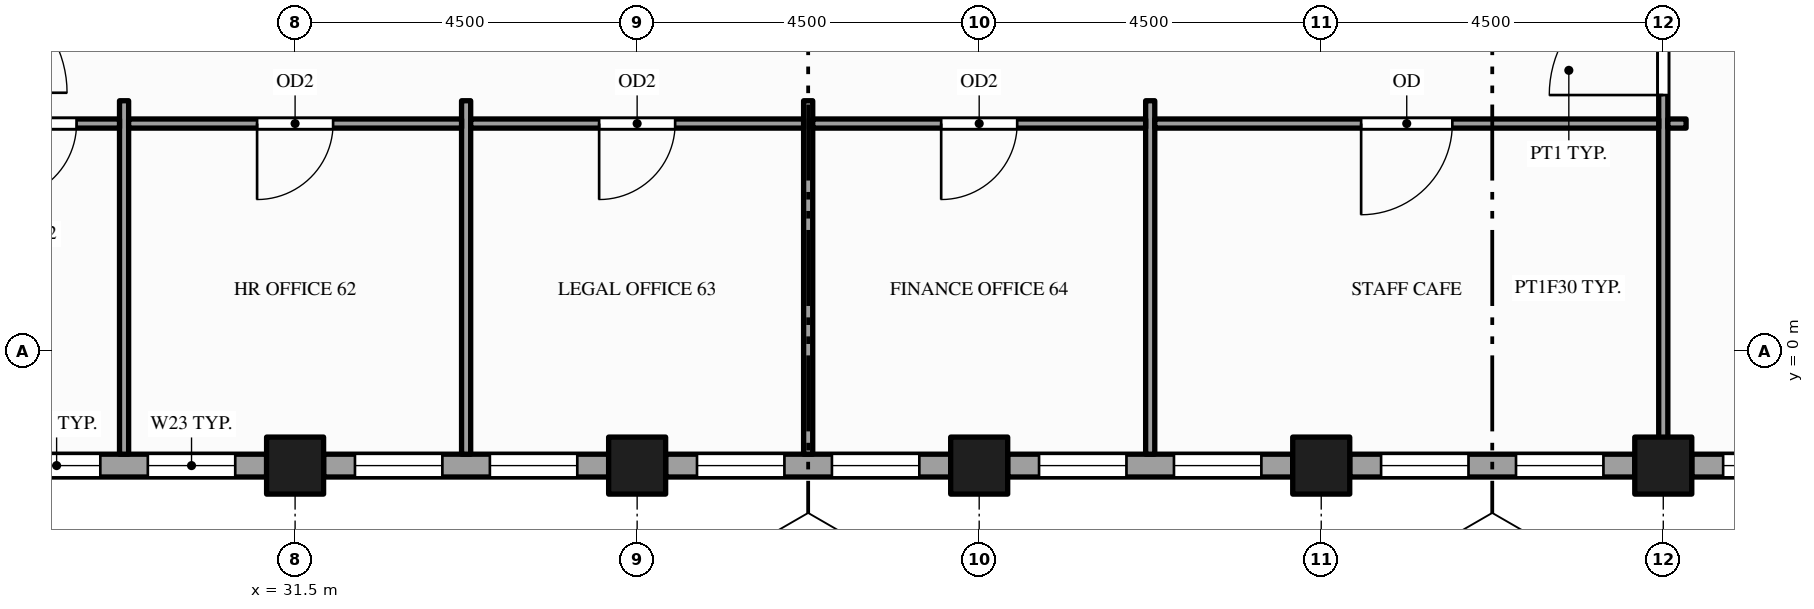
"""IFC4 building model, lengths in metres.
Left out: names, types, materials, properties, quantities, classifications, styles, units other than length and angle.
Written with IfcOpenShell. Run it as: python <this file> out.ifc"""

import sys

from ifc_helpers import new_model, si_unit, direction, frame, frame_2d, origin, origin_2d, place, context, subcontext, project, spatial, rectangle, hollow_rectangle, extrude, element, fill, save


model = new_model("IFC4")
c1 = context("Model", 3, precision=1e-05, world=origin(), true_north=direction((0.0, 1.0)))
c2 = subcontext(c1, "Body", "Model", "MODEL_VIEW")
j1 = project(units=[si_unit("LENGTHUNIT", "METRE"), si_unit("PLANEANGLEUNIT", "RADIAN")], contexts=[c1])
p1 = place(None, origin())
s1 = spatial("IfcSite", under=j1, at=p1, CompositionType="ELEMENT")
p2 = place(p1, origin())
s2 = spatial("IfcBuilding", under=s1, at=p2, CompositionType="ELEMENT")
p3 = place(p2, frame((0.0, 0.0, 199.0)))
s3 = spatial("IfcBuildingStorey", under=s2, at=p3, CompositionType="ELEMENT", Elevation=199.0)
for number, where, z_axis, x_axis in (
    (1, (31.5, -1.5, -0.15), (0.0, 0.0, 1.0), (1.0, 0.0, 0.0)),
    (2, (36.0, -1.5, -0.15), (0.0, 0.0, 1.0), (1.0, 0.0, 0.0)),
    (3, (40.5, -1.5, -0.15), (0.0, 0.0, 1.0), (1.0, 0.0, 0.0)),
    (4, (45.0, -1.5, -0.15), (0.0, 0.0, 1.0), (1.0, 0.0, 0.0)),
    (5, (49.5, -1.5, -0.15), (0.0, 0.0, 1.0), (1.0, 0.0, 0.0)),
):
    element("IfcColumn", number, at=place(p3, frame(where, z_axis=z_axis, x_axis=x_axis)), inside=s3, PredefinedType="COLUMN", context=c2, shape_type="SweptSolid", body=[
        extrude(hollow_rectangle(XDim=0.75, YDim=0.75, WallThickness=0.036, at=origin_2d()), origin(), (0.0, 0.0, 1.0), 4.0),
    ])
p4 = place(p3, frame((27.375, -1.5, 0.0), z_axis=(0.0, 0.0, 1.0), x_axis=(1.0, 0.0, 0.0)))
e6 = element("IfcWall", 6, at=p4, inside=s3, PredefinedType="STANDARD", context=c2, shape_type="SweptSolid", body=[
    extrude(rectangle(XDim=3.75, YDim=0.3, at=frame_2d((1.875, 0.0))), origin(), (0.0, 0.0, 1.0), 2.87),
])
p5 = place(p4, frame((0.413, 0.0, 0.9)))
e7 = element("IfcOpeningElement", 7, at=p5, cuts=e6, PredefinedType="OPENING", context=c2, shape_type="SweptSolid", body=[
    extrude(rectangle(XDim=1.15, YDim=1.75, at=frame_2d((0.575, 0.875))), frame((0.0, 0.16, 0.0), z_axis=(0.0, -1.0, 0.0), x_axis=(1.0, 0.0, 0.0)), (0.0, 0.0, 1.0), 0.32),
])
p6 = place(p4, frame((2.188, 0.0, 0.9)))
e8 = element("IfcOpeningElement", 8, at=p6, cuts=e6, PredefinedType="OPENING", context=c2, shape_type="SweptSolid", body=[
    extrude(rectangle(XDim=1.15, YDim=1.75, at=frame_2d((0.575, 0.875))), frame((0.0, 0.16, 0.0), z_axis=(0.0, -1.0, 0.0), x_axis=(1.0, 0.0, 0.0)), (0.0, 0.0, 1.0), 0.32),
])
p7 = place(p3, frame((31.875, -1.5, 0.0), z_axis=(0.0, 0.0, 1.0), x_axis=(1.0, 0.0, 0.0)))
e9 = element("IfcWall", 9, at=p7, inside=s3, PredefinedType="STANDARD", context=c2, shape_type="SweptSolid", body=[
    extrude(rectangle(XDim=3.75, YDim=0.3, at=frame_2d((1.875, 0.0))), origin(), (0.0, 0.0, 1.0), 2.87),
])
p8 = place(p7, frame((0.413, 0.0, 0.9)))
e10 = element("IfcOpeningElement", 10, at=p8, cuts=e9, PredefinedType="OPENING", context=c2, shape_type="SweptSolid", body=[
    extrude(rectangle(XDim=1.15, YDim=1.75, at=frame_2d((0.575, 0.875))), frame((0.0, 0.16, 0.0), z_axis=(0.0, -1.0, 0.0), x_axis=(1.0, 0.0, 0.0)), (0.0, 0.0, 1.0), 0.32),
])
p9 = place(p7, frame((2.188, 0.0, 0.9)))
e11 = element("IfcOpeningElement", 11, at=p9, cuts=e9, PredefinedType="OPENING", context=c2, shape_type="SweptSolid", body=[
    extrude(rectangle(XDim=1.15, YDim=1.75, at=frame_2d((0.575, 0.875))), frame((0.0, 0.16, 0.0), z_axis=(0.0, -1.0, 0.0), x_axis=(1.0, 0.0, 0.0)), (0.0, 0.0, 1.0), 0.32),
])
p10 = place(p3, frame((36.375, -1.5, 0.0), z_axis=(0.0, 0.0, 1.0), x_axis=(1.0, 0.0, 0.0)))
e12 = element("IfcWall", 12, at=p10, inside=s3, PredefinedType="STANDARD", context=c2, shape_type="SweptSolid", body=[
    extrude(rectangle(XDim=3.75, YDim=0.3, at=frame_2d((1.875, 0.0))), origin(), (0.0, 0.0, 1.0), 2.87),
])
p11 = place(p10, frame((0.413, 0.0, 0.9)))
e13 = element("IfcOpeningElement", 13, at=p11, cuts=e12, PredefinedType="OPENING", context=c2, shape_type="SweptSolid", body=[
    extrude(rectangle(XDim=1.15, YDim=1.75, at=frame_2d((0.575, 0.875))), frame((0.0, 0.16, 0.0), z_axis=(0.0, -1.0, 0.0), x_axis=(1.0, 0.0, 0.0)), (0.0, 0.0, 1.0), 0.32),
])
p12 = place(p10, frame((2.188, 0.0, 0.9)))
e14 = element("IfcOpeningElement", 14, at=p12, cuts=e12, PredefinedType="OPENING", context=c2, shape_type="SweptSolid", body=[
    extrude(rectangle(XDim=1.15, YDim=1.75, at=frame_2d((0.575, 0.875))), frame((0.0, 0.16, 0.0), z_axis=(0.0, -1.0, 0.0), x_axis=(1.0, 0.0, 0.0)), (0.0, 0.0, 1.0), 0.32),
])
p13 = place(p3, frame((40.875, -1.5, 0.0), z_axis=(0.0, 0.0, 1.0), x_axis=(1.0, 0.0, 0.0)))
e15 = element("IfcWall", 15, at=p13, inside=s3, PredefinedType="STANDARD", context=c2, shape_type="SweptSolid", body=[
    extrude(rectangle(XDim=3.75, YDim=0.3, at=frame_2d((1.875, 0.0))), origin(), (0.0, 0.0, 1.0), 2.87),
])
p14 = place(p13, frame((0.413, 0.0, 0.9)))
e16 = element("IfcOpeningElement", 16, at=p14, cuts=e15, PredefinedType="OPENING", context=c2, shape_type="SweptSolid", body=[
    extrude(rectangle(XDim=1.15, YDim=1.75, at=frame_2d((0.575, 0.875))), frame((0.0, 0.16, 0.0), z_axis=(0.0, -1.0, 0.0), x_axis=(1.0, 0.0, 0.0)), (0.0, 0.0, 1.0), 0.32),
])
p15 = place(p13, frame((2.188, 0.0, 0.9)))
e17 = element("IfcOpeningElement", 17, at=p15, cuts=e15, PredefinedType="OPENING", context=c2, shape_type="SweptSolid", body=[
    extrude(rectangle(XDim=1.15, YDim=1.75, at=frame_2d((0.575, 0.875))), frame((0.0, 0.16, 0.0), z_axis=(0.0, -1.0, 0.0), x_axis=(1.0, 0.0, 0.0)), (0.0, 0.0, 1.0), 0.32),
])
p16 = place(p3, frame((45.375, -1.5, 0.0), z_axis=(0.0, 0.0, 1.0), x_axis=(1.0, 0.0, 0.0)))
e18 = element("IfcWall", 18, at=p16, inside=s3, PredefinedType="STANDARD", context=c2, shape_type="SweptSolid", body=[
    extrude(rectangle(XDim=3.75, YDim=0.3, at=frame_2d((1.875, 0.0))), origin(), (0.0, 0.0, 1.0), 2.87),
])
p17 = place(p16, frame((0.413, 0.0, 0.9)))
e19 = element("IfcOpeningElement", 19, at=p17, cuts=e18, PredefinedType="OPENING", context=c2, shape_type="SweptSolid", body=[
    extrude(rectangle(XDim=1.15, YDim=1.75, at=frame_2d((0.575, 0.875))), frame((0.0, 0.16, 0.0), z_axis=(0.0, -1.0, 0.0), x_axis=(1.0, 0.0, 0.0)), (0.0, 0.0, 1.0), 0.32),
])
p18 = place(p16, frame((2.188, 0.0, 0.9)))
e20 = element("IfcOpeningElement", 20, at=p18, cuts=e18, PredefinedType="OPENING", context=c2, shape_type="SweptSolid", body=[
    extrude(rectangle(XDim=1.15, YDim=1.75, at=frame_2d((0.575, 0.875))), frame((0.0, 0.16, 0.0), z_axis=(0.0, -1.0, 0.0), x_axis=(1.0, 0.0, 0.0)), (0.0, 0.0, 1.0), 0.32),
])
p19 = place(p3, frame((49.875, -1.5, 0.0), z_axis=(0.0, 0.0, 1.0), x_axis=(1.0, 0.0, 0.0)))
e21 = element("IfcWall", 21, at=p19, inside=s3, PredefinedType="STANDARD", context=c2, shape_type="SweptSolid", body=[
    extrude(rectangle(XDim=3.75, YDim=0.3, at=frame_2d((1.875, 0.0))), origin(), (0.0, 0.0, 1.0), 2.87),
])
p20 = place(p19, frame((0.413, 0.0, 0.9)))
e22 = element("IfcOpeningElement", 22, at=p20, cuts=e21, PredefinedType="OPENING", context=c2, shape_type="SweptSolid", body=[
    extrude(rectangle(XDim=1.15, YDim=1.75, at=frame_2d((0.575, 0.875))), frame((0.0, 0.16, 0.0), z_axis=(0.0, -1.0, 0.0), x_axis=(1.0, 0.0, 0.0)), (0.0, 0.0, 1.0), 0.32),
])
p21 = place(p19, frame((2.188, 0.0, 0.9)))
e23 = element("IfcOpeningElement", 23, at=p21, cuts=e21, PredefinedType="OPENING", context=c2, shape_type="SweptSolid", body=[
    extrude(rectangle(XDim=1.15, YDim=1.75, at=frame_2d((0.575, 0.875))), frame((0.0, 0.16, 0.0), z_axis=(0.0, -1.0, 0.0), x_axis=(1.0, 0.0, 0.0)), (0.0, 0.0, 1.0), 0.32),
])
for number, where, z_axis, x_axis in (
    (24, (29.25, -1.35, 0.0), (0.0, 0.0, 1.0), (0.0, 1.0, 0.0)),
    (25, (33.75, -1.35, 0.0), (0.0, 0.0, 1.0), (0.0, 1.0, 0.0)),
    (26, (38.25, -1.35, 0.0), (0.0, 0.0, 1.0), (0.0, 1.0, 0.0)),
    (27, (42.75, -1.35, 0.0), (0.0, 0.0, 1.0), (0.0, 1.0, 0.0)),
):
    element("IfcWall", number, at=place(p3, frame(where, z_axis=z_axis, x_axis=x_axis)), inside=s3, PredefinedType="PARTITIONING", context=c2, shape_type="SweptSolid", body=[
        extrude(rectangle(XDim=4.65, YDim=0.12, at=frame_2d((2.325, 0.0))), origin(), (0.0, 0.0, 1.0), 2.87),
    ])
p22 = place(p3, frame((49.5, -1.35, 0.0), z_axis=(0.0, 0.0, 1.0), x_axis=(0.0, 1.0, 0.0)))
e28 = element("IfcWall", 28, at=p22, inside=s3, PredefinedType="PARTITIONING", context=c2, shape_type="SweptSolid", body=[
    extrude(rectangle(XDim=22.2, YDim=0.12, at=frame_2d((11.1, 0.0))), origin(), (0.0, 0.0, 1.0), 2.87),
])
p23 = place(p22, frame((4.725, 0.0, 0.0)))
e29 = element("IfcOpeningElement", 29, at=p23, cuts=e28, PredefinedType="OPENING", context=c2, shape_type="SweptSolid", body=[
    extrude(rectangle(XDim=1.5, YDim=2.1, at=frame_2d((0.75, 1.05))), frame((0.0, 0.07, 0.0), z_axis=(0.0, -1.0, 0.0), x_axis=(1.0, 0.0, 0.0)), (0.0, 0.0, 1.0), 0.14),
])
p24 = place(p22, frame((15.975, 0.0, 0.0)))
e30 = element("IfcOpeningElement", 30, at=p24, cuts=e28, PredefinedType="OPENING", context=c2, shape_type="SweptSolid", body=[
    extrude(rectangle(XDim=1.5, YDim=2.1, at=frame_2d((0.75, 1.05))), frame((0.0, 0.07, 0.0), z_axis=(0.0, -1.0, 0.0), x_axis=(1.0, 0.0, 0.0)), (0.0, 0.0, 1.0), 0.14),
])
p25 = place(p22, frame((7.6, 0.0, 0.0)))
e31 = element("IfcOpeningElement", 31, at=p25, cuts=e28, PredefinedType="OPENING", context=c2, shape_type="SweptSolid", body=[
    extrude(rectangle(XDim=0.9, YDim=2.1, at=frame_2d((0.45, 1.05))), frame((0.0, 0.07, 0.0), z_axis=(0.0, -1.0, 0.0), x_axis=(1.0, 0.0, 0.0)), (0.0, 0.0, 1.0), 0.14),
])
p26 = place(p22, frame((10.65, 0.0, 0.0)))
e32 = element("IfcOpeningElement", 32, at=p26, cuts=e28, PredefinedType="OPENING", context=c2, shape_type="SweptSolid", body=[
    extrude(rectangle(XDim=0.9, YDim=2.1, at=frame_2d((0.45, 1.05))), frame((0.0, 0.07, 0.0), z_axis=(0.0, -1.0, 0.0), x_axis=(1.0, 0.0, 0.0)), (0.0, 0.0, 1.0), 0.14),
])
p27 = place(p22, frame((13.6, 0.0, 0.0)))
e33 = element("IfcOpeningElement", 33, at=p27, cuts=e28, PredefinedType="OPENING", context=c2, shape_type="SweptSolid", body=[
    extrude(rectangle(XDim=1.0, YDim=2.1, at=frame_2d((0.5, 1.05))), frame((0.0, 0.07, 0.0), z_axis=(0.0, -1.0, 0.0), x_axis=(1.0, 0.0, 0.0)), (0.0, 0.0, 1.0), 0.14),
])
p28 = place(p3, frame((27.06, 3.0, 0.0), z_axis=(0.0, 0.0, 1.0), x_axis=(1.0, 0.0, 0.0)))
e34 = element("IfcWall", 34, at=p28, inside=s3, PredefinedType="PARTITIONING", context=c2, shape_type="SweptSolid", body=[
    extrude(rectangle(XDim=2.13, YDim=0.12, at=frame_2d((1.065, 0.0))), origin(), (0.0, 0.0, 1.0), 2.87),
])
p29 = place(p28, frame((0.565, 0.0, 0.0)))
e35 = element("IfcOpeningElement", 35, at=p29, cuts=e34, PredefinedType="OPENING", context=c2, shape_type="SweptSolid", body=[
    extrude(rectangle(XDim=1.0, YDim=2.1, at=frame_2d((0.5, 1.05))), frame((0.0, 0.07, 0.0), z_axis=(0.0, -1.0, 0.0), x_axis=(1.0, 0.0, 0.0)), (0.0, 0.0, 1.0), 0.14),
])
p30 = place(p3, frame((29.31, 3.0, 0.0), z_axis=(0.0, 0.0, 1.0), x_axis=(1.0, 0.0, 0.0)))
e36 = element("IfcWall", 36, at=p30, inside=s3, PredefinedType="PARTITIONING", context=c2, shape_type="SweptSolid", body=[
    extrude(rectangle(XDim=4.38, YDim=0.12, at=frame_2d((2.19, 0.0))), origin(), (0.0, 0.0, 1.0), 2.87),
])
p31 = place(p30, frame((1.69, 0.0, 0.0)))
e37 = element("IfcOpeningElement", 37, at=p31, cuts=e36, PredefinedType="OPENING", context=c2, shape_type="SweptSolid", body=[
    extrude(rectangle(XDim=1.0, YDim=2.1, at=frame_2d((0.5, 1.05))), frame((0.0, 0.07, 0.0), z_axis=(0.0, -1.0, 0.0), x_axis=(1.0, 0.0, 0.0)), (0.0, 0.0, 1.0), 0.14),
])
p32 = place(p3, frame((33.81, 3.0, 0.0), z_axis=(0.0, 0.0, 1.0), x_axis=(1.0, 0.0, 0.0)))
e38 = element("IfcWall", 38, at=p32, inside=s3, PredefinedType="PARTITIONING", context=c2, shape_type="SweptSolid", body=[
    extrude(rectangle(XDim=4.38, YDim=0.12, at=frame_2d((2.19, 0.0))), origin(), (0.0, 0.0, 1.0), 2.87),
])
p33 = place(p32, frame((1.69, 0.0, 0.0)))
e39 = element("IfcOpeningElement", 39, at=p33, cuts=e38, PredefinedType="OPENING", context=c2, shape_type="SweptSolid", body=[
    extrude(rectangle(XDim=1.0, YDim=2.1, at=frame_2d((0.5, 1.05))), frame((0.0, 0.07, 0.0), z_axis=(0.0, -1.0, 0.0), x_axis=(1.0, 0.0, 0.0)), (0.0, 0.0, 1.0), 0.14),
])
p34 = place(p3, frame((38.31, 3.0, 0.0), z_axis=(0.0, 0.0, 1.0), x_axis=(1.0, 0.0, 0.0)))
e40 = element("IfcWall", 40, at=p34, inside=s3, PredefinedType="PARTITIONING", context=c2, shape_type="SweptSolid", body=[
    extrude(rectangle(XDim=4.38, YDim=0.12, at=frame_2d((2.19, 0.0))), origin(), (0.0, 0.0, 1.0), 2.87),
])
p35 = place(p34, frame((1.69, 0.0, 0.0)))
e41 = element("IfcOpeningElement", 41, at=p35, cuts=e40, PredefinedType="OPENING", context=c2, shape_type="SweptSolid", body=[
    extrude(rectangle(XDim=1.0, YDim=2.1, at=frame_2d((0.5, 1.05))), frame((0.0, 0.07, 0.0), z_axis=(0.0, -1.0, 0.0), x_axis=(1.0, 0.0, 0.0)), (0.0, 0.0, 1.0), 0.14),
])
p36 = place(p3, frame((42.81, 3.0, 0.0), z_axis=(0.0, 0.0, 1.0), x_axis=(1.0, 0.0, 0.0)))
e42 = element("IfcWall", 42, at=p36, inside=s3, PredefinedType="PARTITIONING", context=c2, shape_type="SweptSolid", body=[
    extrude(rectangle(XDim=6.63, YDim=0.12, at=frame_2d((3.315, 0.0))), origin(), (0.0, 0.0, 1.0), 2.87),
])
p37 = place(p36, frame((2.715, 0.0, 0.0)))
e43 = element("IfcOpeningElement", 43, at=p37, cuts=e42, PredefinedType="OPENING", context=c2, shape_type="SweptSolid", body=[
    extrude(rectangle(XDim=1.2, YDim=2.1, at=frame_2d((0.6, 1.05))), frame((0.0, 0.07, 0.0), z_axis=(0.0, -1.0, 0.0), x_axis=(1.0, 0.0, 0.0)), (0.0, 0.0, 1.0), 0.14),
])
p38 = place(p3, frame((49.56, 3.0, 0.0), z_axis=(0.0, 0.0, 1.0), x_axis=(1.0, 0.0, 0.0)))
e44 = element("IfcWall", 44, at=p38, inside=s3, PredefinedType="PARTITIONING", context=c2, shape_type="SweptSolid", body=[
    extrude(rectangle(XDim=0.24, YDim=0.12, at=frame_2d((0.12, 0.0))), origin(), (0.0, 0.0, 1.0), 2.87),
])
p39 = place(p5, origin())
e45 = element("IfcWindow", 45, at=p39, inside=s3, PartitioningType="SINGLE_PANEL", PredefinedType="WINDOW", context=c2, shape_type="SweptSolid", body=[
    extrude(rectangle(XDim=1.15, YDim=1.75, at=frame_2d((0.575, 0.875))), frame((0.0, 0.03, 0.0), z_axis=(0.0, -1.0, 0.0), x_axis=(1.0, 0.0, 0.0)), (0.0, 0.0, 1.0), 0.06),
])
fill(e7, e45)
p40 = place(p6, origin())
e46 = element("IfcWindow", 46, at=p40, inside=s3, PartitioningType="SINGLE_PANEL", PredefinedType="WINDOW", context=c2, shape_type="SweptSolid", body=[
    extrude(rectangle(XDim=1.15, YDim=1.75, at=frame_2d((0.575, 0.875))), frame((0.0, 0.03, 0.0), z_axis=(0.0, -1.0, 0.0), x_axis=(1.0, 0.0, 0.0)), (0.0, 0.0, 1.0), 0.06),
])
fill(e8, e46)
p41 = place(p8, origin())
e47 = element("IfcWindow", 47, at=p41, inside=s3, PartitioningType="SINGLE_PANEL", PredefinedType="WINDOW", context=c2, shape_type="SweptSolid", body=[
    extrude(rectangle(XDim=1.15, YDim=1.75, at=frame_2d((0.575, 0.875))), frame((0.0, 0.03, 0.0), z_axis=(0.0, -1.0, 0.0), x_axis=(1.0, 0.0, 0.0)), (0.0, 0.0, 1.0), 0.06),
])
fill(e10, e47)
p42 = place(p9, origin())
e48 = element("IfcWindow", 48, at=p42, inside=s3, PartitioningType="SINGLE_PANEL", PredefinedType="WINDOW", context=c2, shape_type="SweptSolid", body=[
    extrude(rectangle(XDim=1.15, YDim=1.75, at=frame_2d((0.575, 0.875))), frame((0.0, 0.03, 0.0), z_axis=(0.0, -1.0, 0.0), x_axis=(1.0, 0.0, 0.0)), (0.0, 0.0, 1.0), 0.06),
])
fill(e11, e48)
p43 = place(p11, origin())
e49 = element("IfcWindow", 49, at=p43, inside=s3, PartitioningType="SINGLE_PANEL", PredefinedType="WINDOW", context=c2, shape_type="SweptSolid", body=[
    extrude(rectangle(XDim=1.15, YDim=1.75, at=frame_2d((0.575, 0.875))), frame((0.0, 0.03, 0.0), z_axis=(0.0, -1.0, 0.0), x_axis=(1.0, 0.0, 0.0)), (0.0, 0.0, 1.0), 0.06),
])
fill(e13, e49)
p44 = place(p12, origin())
e50 = element("IfcWindow", 50, at=p44, inside=s3, PartitioningType="SINGLE_PANEL", PredefinedType="WINDOW", context=c2, shape_type="SweptSolid", body=[
    extrude(rectangle(XDim=1.15, YDim=1.75, at=frame_2d((0.575, 0.875))), frame((0.0, 0.03, 0.0), z_axis=(0.0, -1.0, 0.0), x_axis=(1.0, 0.0, 0.0)), (0.0, 0.0, 1.0), 0.06),
])
fill(e14, e50)
p45 = place(p14, origin())
e51 = element("IfcWindow", 51, at=p45, inside=s3, PartitioningType="SINGLE_PANEL", PredefinedType="WINDOW", context=c2, shape_type="SweptSolid", body=[
    extrude(rectangle(XDim=1.15, YDim=1.75, at=frame_2d((0.575, 0.875))), frame((0.0, 0.03, 0.0), z_axis=(0.0, -1.0, 0.0), x_axis=(1.0, 0.0, 0.0)), (0.0, 0.0, 1.0), 0.06),
])
fill(e16, e51)
p46 = place(p15, origin())
e52 = element("IfcWindow", 52, at=p46, inside=s3, PartitioningType="SINGLE_PANEL", PredefinedType="WINDOW", context=c2, shape_type="SweptSolid", body=[
    extrude(rectangle(XDim=1.15, YDim=1.75, at=frame_2d((0.575, 0.875))), frame((0.0, 0.03, 0.0), z_axis=(0.0, -1.0, 0.0), x_axis=(1.0, 0.0, 0.0)), (0.0, 0.0, 1.0), 0.06),
])
fill(e17, e52)
p47 = place(p17, origin())
e53 = element("IfcWindow", 53, at=p47, inside=s3, PartitioningType="SINGLE_PANEL", PredefinedType="WINDOW", context=c2, shape_type="SweptSolid", body=[
    extrude(rectangle(XDim=1.15, YDim=1.75, at=frame_2d((0.575, 0.875))), frame((0.0, 0.03, 0.0), z_axis=(0.0, -1.0, 0.0), x_axis=(1.0, 0.0, 0.0)), (0.0, 0.0, 1.0), 0.06),
])
fill(e19, e53)
p48 = place(p18, origin())
e54 = element("IfcWindow", 54, at=p48, inside=s3, PartitioningType="SINGLE_PANEL", PredefinedType="WINDOW", context=c2, shape_type="SweptSolid", body=[
    extrude(rectangle(XDim=1.15, YDim=1.75, at=frame_2d((0.575, 0.875))), frame((0.0, 0.03, 0.0), z_axis=(0.0, -1.0, 0.0), x_axis=(1.0, 0.0, 0.0)), (0.0, 0.0, 1.0), 0.06),
])
fill(e20, e54)
p49 = place(p20, origin())
e55 = element("IfcWindow", 55, at=p49, inside=s3, PartitioningType="SINGLE_PANEL", PredefinedType="WINDOW", context=c2, shape_type="SweptSolid", body=[
    extrude(rectangle(XDim=1.15, YDim=1.75, at=frame_2d((0.575, 0.875))), frame((0.0, 0.03, 0.0), z_axis=(0.0, -1.0, 0.0), x_axis=(1.0, 0.0, 0.0)), (0.0, 0.0, 1.0), 0.06),
])
fill(e22, e55)
p50 = place(p23, origin())
e56 = element("IfcDoor", 56, at=p50, inside=s3, OperationType="SINGLE_SWING_LEFT", PredefinedType="DOOR", context=c2, shape_type="SweptSolid", body=[
    extrude(rectangle(XDim=1.5, YDim=2.1, at=frame_2d((0.75, 1.05))), frame((0.0, 0.025, 0.0), z_axis=(0.0, -1.0, 0.0), x_axis=(1.0, 0.0, 0.0)), (0.0, 0.0, 1.0), 0.05),
])
fill(e29, e56)
p51 = place(p29, origin())
e57 = element("IfcDoor", 57, at=p51, inside=s3, OperationType="SINGLE_SWING_LEFT", PredefinedType="DOOR", context=c2, shape_type="SweptSolid", body=[
    extrude(rectangle(XDim=1.0, YDim=2.1, at=frame_2d((0.5, 1.05))), frame((0.0, 0.025, 0.0), z_axis=(0.0, -1.0, 0.0), x_axis=(1.0, 0.0, 0.0)), (0.0, 0.0, 1.0), 0.05),
])
fill(e35, e57)
p52 = place(p31, origin())
e58 = element("IfcDoor", 58, at=p52, inside=s3, OperationType="SINGLE_SWING_LEFT", PredefinedType="DOOR", context=c2, shape_type="SweptSolid", body=[
    extrude(rectangle(XDim=1.0, YDim=2.1, at=frame_2d((0.5, 1.05))), frame((0.0, 0.025, 0.0), z_axis=(0.0, -1.0, 0.0), x_axis=(1.0, 0.0, 0.0)), (0.0, 0.0, 1.0), 0.05),
])
fill(e37, e58)
p53 = place(p33, origin())
e59 = element("IfcDoor", 59, at=p53, inside=s3, OperationType="SINGLE_SWING_LEFT", PredefinedType="DOOR", context=c2, shape_type="SweptSolid", body=[
    extrude(rectangle(XDim=1.0, YDim=2.1, at=frame_2d((0.5, 1.05))), frame((0.0, 0.025, 0.0), z_axis=(0.0, -1.0, 0.0), x_axis=(1.0, 0.0, 0.0)), (0.0, 0.0, 1.0), 0.05),
])
fill(e39, e59)
p54 = place(p35, origin())
e60 = element("IfcDoor", 60, at=p54, inside=s3, OperationType="SINGLE_SWING_LEFT", PredefinedType="DOOR", context=c2, shape_type="SweptSolid", body=[
    extrude(rectangle(XDim=1.0, YDim=2.1, at=frame_2d((0.5, 1.05))), frame((0.0, 0.025, 0.0), z_axis=(0.0, -1.0, 0.0), x_axis=(1.0, 0.0, 0.0)), (0.0, 0.0, 1.0), 0.05),
])
fill(e41, e60)
p55 = place(p37, origin())
e61 = element("IfcDoor", 61, at=p55, inside=s3, OperationType="SINGLE_SWING_LEFT", PredefinedType="DOOR", context=c2, shape_type="SweptSolid", body=[
    extrude(rectangle(XDim=1.2, YDim=2.1, at=frame_2d((0.6, 1.05))), frame((0.0, 0.025, 0.0), z_axis=(0.0, -1.0, 0.0), x_axis=(1.0, 0.0, 0.0)), (0.0, 0.0, 1.0), 0.05),
])
fill(e43, e61)
save(model, sys.argv[1])
